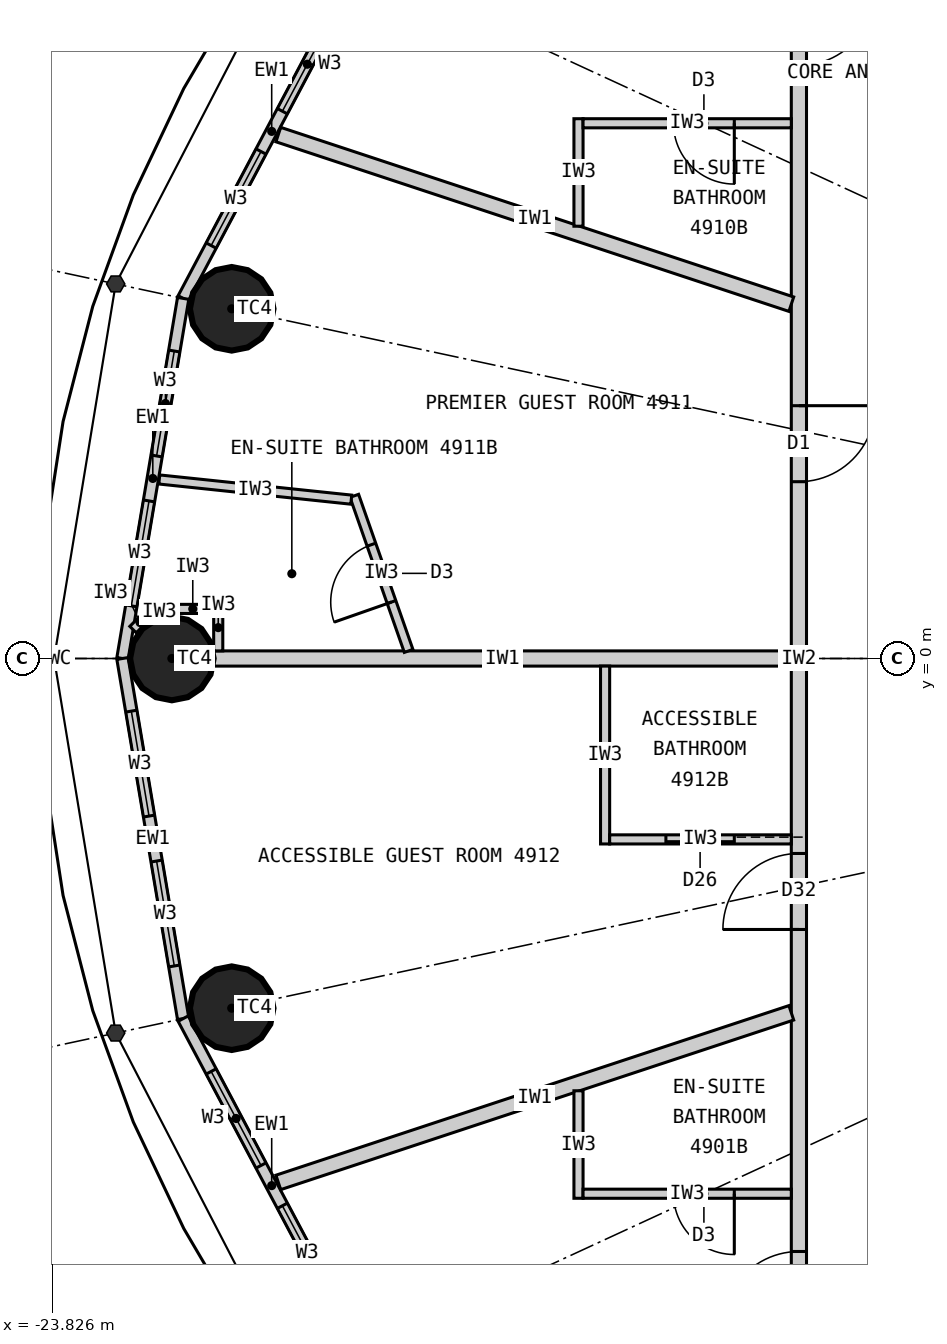
"""IFC4 building model, lengths in metres.
Left out: names, types, materials, properties, quantities, classifications, styles, units other than length and angle.
Written with IfcOpenShell. Run it as: python <this file> out.ifc"""

import sys

from ifc_helpers import new_model, si_unit, direction, frame, frame_2d, origin, origin_2d, place, context, subcontext, project, spatial, rectangle, circle, extrude, clip, halfspace, element, fill, save


model = new_model("IFC4")
c1 = context("Model", 3, precision=1e-05, world=origin(), true_north=direction((0.0, 1.0)))
c2 = subcontext(c1, "Body", "Model", "MODEL_VIEW")
j1 = project(units=[si_unit("LENGTHUNIT", "METRE"), si_unit("PLANEANGLEUNIT", "RADIAN")], contexts=[c1])
p1 = place(None, origin())
s1 = spatial("IfcSite", under=j1, at=p1, CompositionType="ELEMENT")
p2 = place(p1, origin())
s2 = spatial("IfcBuilding", under=s1, at=p2, CompositionType="ELEMENT")
p3 = place(p2, frame((0.0, 0.0, 183.0)))
s3 = spatial("IfcBuildingStorey", under=s2, at=p3, CompositionType="ELEMENT", Elevation=183.0)
for number, where, z_axis, x_axis in (
    (1, (-21.463, 4.601, 0.0), (0.0, 0.0, 1.0), (1.0, 0.0, 0.0)),
    (2, (-22.25, 0.0, 0.0), (0.0, 0.0, 1.0), (1.0, 0.0, 0.0)),
    (3, (-21.463, -4.601, 0.0), (0.0, 0.0, 1.0), (1.0, 0.0, 0.0)),
):
    element("IfcColumn", number, at=place(p3, frame(where, z_axis=z_axis, x_axis=x_axis)), inside=s3, PredefinedType="COLUMN", context=c2, shape_type="Clipping", body=[
        clip(extrude(circle(Radius=0.55, at=origin_2d()), origin(), (0.0, 0.0, 1.0), 3.3), halfspace(frame((0.0, 0.0, 2.25), z_axis=(0.0, 0.0, 1.0), x_axis=(1.0, 0.0, 0.0)), False)),
    ])
p4 = place(p3, frame((-19.772, 9.132, 0.0), z_axis=(0.0, 0.0, 1.0), x_axis=(-0.468428906714, -0.883501193748, 0.0)))
e4 = element("IfcWall", 4, at=p4, inside=s3, PredefinedType="ELEMENTEDWALL", context=c2, shape_type="SweptSolid", body=[
    extrude(rectangle(XDim=4.974, YDim=0.15, at=frame_2d((2.487, 0.0))), origin(), (0.0, 0.0, 1.0), 3.05),
])
p5 = place(p4, frame((0.787, 0.0, 0.9)))
e5 = element("IfcOpeningElement", 5, at=p5, cuts=e4, PredefinedType="OPENING", context=c2, shape_type="SweptSolid", body=[
    extrude(rectangle(XDim=1.4, YDim=1.9, at=frame_2d((0.7, 0.95))), frame((0.0, 0.085, 0.0), z_axis=(0.0, -1.0, 0.0), x_axis=(1.0, 0.0, 0.0)), (0.0, 0.0, 1.0), 0.17),
])
p6 = place(p4, frame((2.787, 0.0, 0.9)))
e6 = element("IfcOpeningElement", 6, at=p6, cuts=e4, PredefinedType="OPENING", context=c2, shape_type="SweptSolid", body=[
    extrude(rectangle(XDim=1.4, YDim=1.9, at=frame_2d((0.7, 0.95))), frame((0.0, 0.085, 0.0), z_axis=(0.0, -1.0, 0.0), x_axis=(1.0, 0.0, 0.0)), (0.0, 0.0, 1.0), 0.17),
])
p7 = place(p3, frame((-22.102, 4.738, 0.0), z_axis=(0.0, 0.0, 1.0), x_axis=(-0.166162111254, -0.986098449843, 0.0)))
e7 = element("IfcWall", 7, at=p7, inside=s3, PredefinedType="ELEMENTEDWALL", context=c2, shape_type="SweptSolid", body=[
    extrude(rectangle(XDim=4.805, YDim=0.15, at=frame_2d((2.402, 0.0))), origin(), (0.0, 0.0, 1.0), 3.05),
])
p8 = place(p7, frame((0.702, 0.0, 0.9)))
e8 = element("IfcOpeningElement", 8, at=p8, cuts=e7, PredefinedType="OPENING", context=c2, shape_type="SweptSolid", body=[
    extrude(rectangle(XDim=1.4, YDim=1.9, at=frame_2d((0.7, 0.95))), frame((0.0, 0.085, 0.0), z_axis=(0.0, -1.0, 0.0), x_axis=(1.0, 0.0, 0.0)), (0.0, 0.0, 1.0), 0.17),
])
p9 = place(p7, frame((2.702, 0.0, 0.9)))
e9 = element("IfcOpeningElement", 9, at=p9, cuts=e7, PredefinedType="OPENING", context=c2, shape_type="SweptSolid", body=[
    extrude(rectangle(XDim=1.4, YDim=1.9, at=frame_2d((0.7, 0.95))), frame((0.0, 0.085, 0.0), z_axis=(0.0, -1.0, 0.0), x_axis=(1.0, 0.0, 0.0)), (0.0, 0.0, 1.0), 0.17),
])
p10 = place(p3, frame((-22.9, 0.0, 0.0), z_axis=(0.0, 0.0, 1.0), x_axis=(0.166162111254, -0.986098449843, 0.0)))
e10 = element("IfcWall", 10, at=p10, inside=s3, PredefinedType="ELEMENTEDWALL", context=c2, shape_type="SweptSolid", body=[
    extrude(rectangle(XDim=4.805, YDim=0.15, at=frame_2d((2.402, 0.0))), origin(), (0.0, 0.0, 1.0), 3.05),
])
p11 = place(p10, frame((0.702, 0.0, 0.9)))
e11 = element("IfcOpeningElement", 11, at=p11, cuts=e10, PredefinedType="OPENING", context=c2, shape_type="SweptSolid", body=[
    extrude(rectangle(XDim=1.4, YDim=1.9, at=frame_2d((0.7, 0.95))), frame((0.0, 0.085, 0.0), z_axis=(0.0, -1.0, 0.0), x_axis=(1.0, 0.0, 0.0)), (0.0, 0.0, 1.0), 0.17),
])
p12 = place(p10, frame((2.702, 0.0, 0.9)))
e12 = element("IfcOpeningElement", 12, at=p12, cuts=e10, PredefinedType="OPENING", context=c2, shape_type="SweptSolid", body=[
    extrude(rectangle(XDim=1.4, YDim=1.9, at=frame_2d((0.7, 0.95))), frame((0.0, 0.085, 0.0), z_axis=(0.0, -1.0, 0.0), x_axis=(1.0, 0.0, 0.0)), (0.0, 0.0, 1.0), 0.17),
])
p13 = place(p3, frame((-22.102, -4.738, 0.0), z_axis=(0.0, 0.0, 1.0), x_axis=(0.468428906714, -0.883501193748, 0.0)))
e13 = element("IfcWall", 13, at=p13, inside=s3, PredefinedType="ELEMENTEDWALL", context=c2, shape_type="SweptSolid", body=[
    extrude(rectangle(XDim=4.974, YDim=0.15, at=frame_2d((2.487, 0.0))), origin(), (0.0, 0.0, 1.0), 3.05),
])
p14 = place(p13, frame((0.787, 0.0, 0.9)))
e14 = element("IfcOpeningElement", 14, at=p14, cuts=e13, PredefinedType="OPENING", context=c2, shape_type="SweptSolid", body=[
    extrude(rectangle(XDim=1.4, YDim=1.9, at=frame_2d((0.7, 0.95))), frame((0.0, 0.085, 0.0), z_axis=(0.0, -1.0, 0.0), x_axis=(1.0, 0.0, 0.0)), (0.0, 0.0, 1.0), 0.17),
])
p15 = place(p13, frame((2.787, 0.0, 0.9)))
e15 = element("IfcOpeningElement", 15, at=p15, cuts=e13, PredefinedType="OPENING", context=c2, shape_type="SweptSolid", body=[
    extrude(rectangle(XDim=1.4, YDim=1.9, at=frame_2d((0.7, 0.95))), frame((0.0, 0.085, 0.0), z_axis=(0.0, -1.0, 0.0), x_axis=(1.0, 0.0, 0.0)), (0.0, 0.0, 1.0), 0.17),
])
p16 = place(p3, frame((-14.0, 9.9, 0.0), z_axis=(0.0, 0.0, 1.0), x_axis=(0.0, -1.0, 0.0)))
e16 = element("IfcWall", 16, at=p16, inside=s3, PredefinedType="PARTITIONING", context=c2, shape_type="SweptSolid", body=[
    extrude(rectangle(XDim=19.8, YDim=0.2, at=frame_2d((9.9, 0.0))), origin(), (0.0, 0.0, 1.0), 3.05),
])
p17 = place(p16, frame((17.701, 0.0, 0.0)))
e17 = element("IfcOpeningElement", 17, at=p17, cuts=e16, PredefinedType="OPENING", context=c2, shape_type="SweptSolid", body=[
    extrude(rectangle(XDim=1.0, YDim=2.2, at=frame_2d((0.5, 1.1))), frame((0.0, 0.11, 0.0), z_axis=(0.0, -1.0, 0.0), x_axis=(1.0, 0.0, 0.0)), (0.0, 0.0, 1.0), 0.22),
])
p18 = place(p16, frame((1.1, 0.0, 0.0)))
e18 = element("IfcOpeningElement", 18, at=p18, cuts=e16, PredefinedType="OPENING", context=c2, shape_type="SweptSolid", body=[
    extrude(rectangle(XDim=1.0, YDim=2.2, at=frame_2d((0.5, 1.1))), frame((0.0, 0.11, 0.0), z_axis=(0.0, -1.0, 0.0), x_axis=(1.0, 0.0, 0.0)), (0.0, 0.0, 1.0), 0.22),
])
p19 = place(p16, frame((6.574, 0.0, 0.0)))
e19 = element("IfcOpeningElement", 19, at=p19, cuts=e16, PredefinedType="OPENING", context=c2, shape_type="SweptSolid", body=[
    extrude(rectangle(XDim=1.0, YDim=2.2, at=frame_2d((0.5, 1.1))), frame((0.0, 0.11, 0.0), z_axis=(0.0, -1.0, 0.0), x_axis=(1.0, 0.0, 0.0)), (0.0, 0.0, 1.0), 0.22),
])
p20 = place(p16, frame((12.465, 0.0, 0.0)))
e20 = element("IfcOpeningElement", 20, at=p20, cuts=e16, PredefinedType="OPENING", context=c2, shape_type="SweptSolid", body=[
    extrude(rectangle(XDim=1.0, YDim=2.1, at=frame_2d((0.5, 1.05))), frame((0.0, 0.11, 0.0), z_axis=(0.0, -1.0, 0.0), x_axis=(1.0, 0.0, 0.0)), (0.0, 0.0, 1.0), 0.22),
])
p21 = place(p3, frame((-14.1, 4.661, 0.0), z_axis=(0.0, 0.0, 1.0), x_axis=(-0.949453216399, 0.313908569285, 0.0)))
e21 = element("IfcWall", 21, at=p21, inside=s3, PredefinedType="PARTITIONING", context=c2, shape_type="SweptSolid", body=[
    extrude(rectangle(XDim=7.109, YDim=0.2, at=frame_2d((3.554, 0.0))), origin(), (0.0, 0.0, 1.0), 3.05),
])
p22 = place(p3, frame((-14.1, 0.0, 0.0), z_axis=(0.0, 0.0, 1.0), x_axis=(-1.0, 0.0, 0.0)))
e22 = element("IfcWall", 22, at=p22, inside=s3, PredefinedType="PARTITIONING", context=c2, shape_type="SweptSolid", body=[
    extrude(rectangle(XDim=7.6, YDim=0.2, at=frame_2d((3.8, 0.0))), origin(), (0.0, 0.0, 1.0), 2.25),
])
p23 = place(p3, frame((-14.1, -4.661, 0.0), z_axis=(0.0, 0.0, 1.0), x_axis=(-0.949453216399, -0.313908569285, 0.0)))
e23 = element("IfcWall", 23, at=p23, inside=s3, PredefinedType="PARTITIONING", context=c2, shape_type="SweptSolid", body=[
    extrude(rectangle(XDim=7.109, YDim=0.2, at=frame_2d((3.554, 0.0))), origin(), (0.0, 0.0, 1.0), 3.05),
])
p24 = place(p3, frame((-16.9, -5.687, 0.0), z_axis=(0.0, 0.0, 1.0), x_axis=(0.0, -1.0, 0.0)))
e24 = element("IfcWall", 24, at=p24, inside=s3, PredefinedType="PARTITIONING", context=c2, shape_type="SweptSolid", body=[
    extrude(rectangle(XDim=1.414, YDim=0.12, at=frame_2d((0.707, 0.0))), origin(), (0.0, 0.0, 1.0), 3.05),
])
p25 = place(p3, frame((-14.1, -7.042, 0.0), z_axis=(0.0, 0.0, 1.0), x_axis=(-1.0, 0.0, 0.0)))
e25 = element("IfcWall", 25, at=p25, inside=s3, PredefinedType="PARTITIONING", context=c2, shape_type="SweptSolid", body=[
    extrude(rectangle(XDim=2.74, YDim=0.12, at=frame_2d((1.37, 0.0))), origin(), (0.0, 0.0, 1.0), 3.05),
])
p26 = place(p25, frame((0.75, 0.0, 0.0)))
e26 = element("IfcOpeningElement", 26, at=p26, cuts=e25, PredefinedType="OPENING", context=c2, shape_type="SweptSolid", body=[
    extrude(rectangle(XDim=0.8, YDim=2.1, at=frame_2d((0.4, 1.05))), frame((0.0, 0.07, 0.0), z_axis=(0.0, -1.0, 0.0), x_axis=(1.0, 0.0, 0.0)), (0.0, 0.0, 1.0), 0.14),
])
p27 = place(p3, frame((-16.9, 5.687, 0.0), z_axis=(0.0, 0.0, 1.0), x_axis=(0.0, 1.0, 0.0)))
e27 = element("IfcWall", 27, at=p27, inside=s3, PredefinedType="PARTITIONING", context=c2, shape_type="SweptSolid", body=[
    extrude(rectangle(XDim=1.414, YDim=0.12, at=frame_2d((0.707, 0.0))), origin(), (0.0, 0.0, 1.0), 3.05),
])
p28 = place(p3, frame((-14.1, 7.042, 0.0), z_axis=(0.0, 0.0, 1.0), x_axis=(-1.0, 0.0, 0.0)))
e28 = element("IfcWall", 28, at=p28, inside=s3, PredefinedType="PARTITIONING", context=c2, shape_type="SweptSolid", body=[
    extrude(rectangle(XDim=2.74, YDim=0.12, at=frame_2d((1.37, 0.0))), origin(), (0.0, 0.0, 1.0), 3.05),
])
p29 = place(p28, frame((0.75, 0.0, 0.0)))
e29 = element("IfcOpeningElement", 29, at=p29, cuts=e28, PredefinedType="OPENING", context=c2, shape_type="SweptSolid", body=[
    extrude(rectangle(XDim=0.8, YDim=2.1, at=frame_2d((0.4, 1.05))), frame((0.0, 0.07, 0.0), z_axis=(0.0, -1.0, 0.0), x_axis=(1.0, 0.0, 0.0)), (0.0, 0.0, 1.0), 0.14),
])
p30 = place(p3, frame((-19.135, 0.1, 0.0), z_axis=(0.0, 0.0, 1.0), x_axis=(-0.330692497329, 0.943738561367, 0.0)))
e30 = element("IfcWall", 30, at=p30, inside=s3, PredefinedType="PARTITIONING", context=c2, shape_type="SweptSolid", body=[
    extrude(rectangle(XDim=2.162, YDim=0.12, at=frame_2d((1.081, 0.0))), origin(), (0.0, 0.0, 1.0), 3.05),
])
p31 = place(p30, frame((0.681, 0.0, 0.0)))
e31 = element("IfcOpeningElement", 31, at=p31, cuts=e30, PredefinedType="OPENING", context=c2, shape_type="SweptSolid", body=[
    extrude(rectangle(XDim=0.8, YDim=2.1, at=frame_2d((0.4, 1.05))), frame((0.0, 0.07, 0.0), z_axis=(0.0, -1.0, 0.0), x_axis=(1.0, 0.0, 0.0)), (0.0, 0.0, 1.0), 0.14),
])
p32 = place(p3, frame((-19.89, 2.09, 0.0), z_axis=(0.0, 0.0, 1.0), x_axis=(-0.994527025269, 0.104479644, 0.0)))
e32 = element("IfcWall", 32, at=p32, inside=s3, PredefinedType="PARTITIONING", context=c2, shape_type="SweptSolid", body=[
    extrude(rectangle(XDim=2.54, YDim=0.12, at=frame_2d((1.27, 0.0))), origin(), (0.0, 0.0, 1.0), 3.05),
])
p33 = place(p3, frame((-21.64, 0.1, 0.0), z_axis=(0.0, 0.0, 1.0), x_axis=(0.0, 1.0, 0.0)))
e33 = element("IfcWall", 33, at=p33, inside=s3, PredefinedType="PARTITIONING", context=c2, shape_type="SweptSolid", body=[
    extrude(rectangle(XDim=0.612, YDim=0.12, at=frame_2d((0.306, 0.0))), origin(), (0.0, 0.0, 1.0), 3.05),
])
p34 = place(p3, frame((-21.7, 0.652, 0.0), z_axis=(0.0, 0.0, 1.0), x_axis=(-1.0, 0.0, 0.0)))
e34 = element("IfcWall", 34, at=p34, inside=s3, PredefinedType="PARTITIONING", context=c2, shape_type="SweptSolid", body=[
    extrude(rectangle(XDim=0.55, YDim=0.12, at=frame_2d((0.275, 0.0))), origin(), (0.0, 0.0, 1.0), 3.05),
])
p35 = place(p3, frame((-22.25, 0.652, 0.0), z_axis=(0.0, 0.0, 1.0), x_axis=(-0.965922233104, -0.258832454679, 0.0)))
e35 = element("IfcWall", 35, at=p35, inside=s3, PredefinedType="PARTITIONING", context=c2, shape_type="SweptSolid", body=[
    extrude(rectangle(XDim=0.338, YDim=0.12, at=frame_2d((0.169, 0.0))), origin(), (0.0, 0.0, 1.0), 3.05),
])
p36 = place(p3, frame((-22.576, 0.565, 0.0), z_axis=(0.0, 0.0, 1.0), x_axis=(-0.706639272724, -0.707573980757, 0.0)))
e36 = element("IfcWall", 36, at=p36, inside=s3, PredefinedType="PARTITIONING", context=c2, shape_type="SweptSolid", body=[
    extrude(rectangle(XDim=0.261, YDim=0.12, at=frame_2d((0.131, 0.0))), origin(), (0.0, 0.0, 1.0), 3.05),
])
p37 = place(p3, frame((-16.55, -0.1, 0.0), z_axis=(0.0, 0.0, 1.0), x_axis=(0.0, -1.0, 0.0)))
e37 = element("IfcWall", 37, at=p37, inside=s3, PredefinedType="PARTITIONING", context=c2, shape_type="SweptSolid", body=[
    extrude(rectangle(XDim=2.34, YDim=0.12, at=frame_2d((1.17, 0.0))), origin(), (0.0, 0.0, 1.0), 3.05),
])
p38 = place(p3, frame((-14.1, -2.38, 0.0), z_axis=(0.0, 0.0, 1.0), x_axis=(-1.0, 0.0, 0.0)))
e38 = element("IfcWall", 38, at=p38, inside=s3, PredefinedType="PARTITIONING", context=c2, shape_type="SweptSolid", body=[
    extrude(rectangle(XDim=2.39, YDim=0.12, at=frame_2d((1.195, 0.0))), origin(), (0.0, 0.0, 1.0), 3.05),
])
p39 = place(p38, frame((0.75, 0.0, 0.0)))
e39 = element("IfcOpeningElement", 39, at=p39, cuts=e38, PredefinedType="OPENING", context=c2, shape_type="SweptSolid", body=[
    extrude(rectangle(XDim=0.9, YDim=2.1, at=frame_2d((0.45, 1.05))), frame((0.0, 0.07, 0.0), z_axis=(0.0, -1.0, 0.0), x_axis=(1.0, 0.0, 0.0)), (0.0, 0.0, 1.0), 0.14),
])
p40 = place(p5, origin())
e40 = element("IfcWindow", 40, at=p40, inside=s3, PartitioningType="SINGLE_PANEL", PredefinedType="WINDOW", context=c2, shape_type="SweptSolid", body=[
    extrude(rectangle(XDim=1.4, YDim=1.9, at=frame_2d((0.7, 0.95))), frame((0.0, 0.03, 0.0), z_axis=(0.0, -1.0, 0.0), x_axis=(1.0, 0.0, 0.0)), (0.0, 0.0, 1.0), 0.06),
])
fill(e5, e40)
p41 = place(p6, origin())
e41 = element("IfcWindow", 41, at=p41, inside=s3, PartitioningType="SINGLE_PANEL", PredefinedType="WINDOW", context=c2, shape_type="SweptSolid", body=[
    extrude(rectangle(XDim=1.4, YDim=1.9, at=frame_2d((0.7, 0.95))), frame((0.0, 0.03, 0.0), z_axis=(0.0, -1.0, 0.0), x_axis=(1.0, 0.0, 0.0)), (0.0, 0.0, 1.0), 0.06),
])
fill(e6, e41)
p42 = place(p8, origin())
e42 = element("IfcWindow", 42, at=p42, inside=s3, PartitioningType="SINGLE_PANEL", PredefinedType="WINDOW", context=c2, shape_type="SweptSolid", body=[
    extrude(rectangle(XDim=1.4, YDim=1.9, at=frame_2d((0.7, 0.95))), frame((0.0, 0.03, 0.0), z_axis=(0.0, -1.0, 0.0), x_axis=(1.0, 0.0, 0.0)), (0.0, 0.0, 1.0), 0.06),
])
fill(e8, e42)
p43 = place(p9, origin())
e43 = element("IfcWindow", 43, at=p43, inside=s3, PartitioningType="SINGLE_PANEL", PredefinedType="WINDOW", context=c2, shape_type="SweptSolid", body=[
    extrude(rectangle(XDim=1.4, YDim=1.9, at=frame_2d((0.7, 0.95))), frame((0.0, 0.03, 0.0), z_axis=(0.0, -1.0, 0.0), x_axis=(1.0, 0.0, 0.0)), (0.0, 0.0, 1.0), 0.06),
])
fill(e9, e43)
p44 = place(p11, origin())
e44 = element("IfcWindow", 44, at=p44, inside=s3, PartitioningType="SINGLE_PANEL", PredefinedType="WINDOW", context=c2, shape_type="SweptSolid", body=[
    extrude(rectangle(XDim=1.4, YDim=1.9, at=frame_2d((0.7, 0.95))), frame((0.0, 0.03, 0.0), z_axis=(0.0, -1.0, 0.0), x_axis=(1.0, 0.0, 0.0)), (0.0, 0.0, 1.0), 0.06),
])
fill(e11, e44)
p45 = place(p12, origin())
e45 = element("IfcWindow", 45, at=p45, inside=s3, PartitioningType="SINGLE_PANEL", PredefinedType="WINDOW", context=c2, shape_type="SweptSolid", body=[
    extrude(rectangle(XDim=1.4, YDim=1.9, at=frame_2d((0.7, 0.95))), frame((0.0, 0.03, 0.0), z_axis=(0.0, -1.0, 0.0), x_axis=(1.0, 0.0, 0.0)), (0.0, 0.0, 1.0), 0.06),
])
fill(e12, e45)
p46 = place(p14, origin())
e46 = element("IfcWindow", 46, at=p46, inside=s3, PartitioningType="SINGLE_PANEL", PredefinedType="WINDOW", context=c2, shape_type="SweptSolid", body=[
    extrude(rectangle(XDim=1.4, YDim=1.9, at=frame_2d((0.7, 0.95))), frame((0.0, 0.03, 0.0), z_axis=(0.0, -1.0, 0.0), x_axis=(1.0, 0.0, 0.0)), (0.0, 0.0, 1.0), 0.06),
])
fill(e14, e46)
p47 = place(p15, origin())
e47 = element("IfcWindow", 47, at=p47, inside=s3, PartitioningType="SINGLE_PANEL", PredefinedType="WINDOW", context=c2, shape_type="SweptSolid", body=[
    extrude(rectangle(XDim=1.4, YDim=1.9, at=frame_2d((0.7, 0.95))), frame((0.0, 0.03, 0.0), z_axis=(0.0, -1.0, 0.0), x_axis=(1.0, 0.0, 0.0)), (0.0, 0.0, 1.0), 0.06),
])
fill(e15, e47)
p48 = place(p26, origin())
e48 = element("IfcDoor", 48, at=p48, inside=s3, OperationType="SINGLE_SWING_LEFT", PredefinedType="DOOR", context=c2, shape_type="SweptSolid", body=[
    extrude(rectangle(XDim=0.8, YDim=2.1, at=frame_2d((0.4, 1.05))), frame((0.0, 0.025, 0.0), z_axis=(0.0, -1.0, 0.0), x_axis=(1.0, 0.0, 0.0)), (0.0, 0.0, 1.0), 0.05),
])
fill(e26, e48)
p49 = place(p17, origin())
e49 = element("IfcDoor", 49, at=p49, inside=s3, OperationType="SINGLE_SWING_RIGHT", PredefinedType="DOOR", context=c2, shape_type="SweptSolid", body=[
    extrude(rectangle(XDim=1.0, YDim=2.2, at=frame_2d((0.5, 1.1))), frame((0.0, 0.025, 0.0), z_axis=(0.0, -1.0, 0.0), x_axis=(1.0, 0.0, 0.0)), (0.0, 0.0, 1.0), 0.05),
])
fill(e17, e49)
p50 = place(p29, origin())
e50 = element("IfcDoor", 50, at=p50, inside=s3, OperationType="SINGLE_SWING_LEFT", PredefinedType="DOOR", context=c2, shape_type="SweptSolid", body=[
    extrude(rectangle(XDim=0.8, YDim=2.1, at=frame_2d((0.4, 1.05))), frame((0.0, 0.025, 0.0), z_axis=(0.0, -1.0, 0.0), x_axis=(1.0, 0.0, 0.0)), (0.0, 0.0, 1.0), 0.05),
])
fill(e29, e50)
p51 = place(p18, origin())
e51 = element("IfcDoor", 51, at=p51, inside=s3, OperationType="SINGLE_SWING_LEFT", PredefinedType="DOOR", context=c2, shape_type="SweptSolid", body=[
    extrude(rectangle(XDim=1.0, YDim=2.2, at=frame_2d((0.5, 1.1))), frame((0.0, 0.025, 0.0), z_axis=(0.0, -1.0, 0.0), x_axis=(1.0, 0.0, 0.0)), (0.0, 0.0, 1.0), 0.05),
])
fill(e18, e51)
p52 = place(p31, origin())
e52 = element("IfcDoor", 52, at=p52, inside=s3, OperationType="SINGLE_SWING_LEFT", PredefinedType="DOOR", context=c2, shape_type="SweptSolid", body=[
    extrude(rectangle(XDim=0.8, YDim=2.1, at=frame_2d((0.4, 1.05))), frame((0.0, 0.025, 0.0), z_axis=(0.0, -1.0, 0.0), x_axis=(1.0, 0.0, 0.0)), (0.0, 0.0, 1.0), 0.05),
])
fill(e31, e52)
p53 = place(p19, origin())
e53 = element("IfcDoor", 53, at=p53, inside=s3, OperationType="SINGLE_SWING_LEFT", PredefinedType="DOOR", context=c2, shape_type="SweptSolid", body=[
    extrude(rectangle(XDim=1.0, YDim=2.2, at=frame_2d((0.5, 1.1))), frame((0.0, 0.025, 0.0), z_axis=(0.0, -1.0, 0.0), x_axis=(1.0, 0.0, 0.0)), (0.0, 0.0, 1.0), 0.05),
])
fill(e19, e53)
p54 = place(p39, origin())
e54 = element("IfcDoor", 54, at=p54, inside=s3, OperationType="SLIDING_TO_LEFT", PredefinedType="DOOR", context=c2, shape_type="SweptSolid", body=[
    extrude(rectangle(XDim=0.9, YDim=2.1, at=frame_2d((0.45, 1.05))), frame((0.0, 0.025, 0.0), z_axis=(0.0, -1.0, 0.0), x_axis=(1.0, 0.0, 0.0)), (0.0, 0.0, 1.0), 0.05),
])
fill(e39, e54)
p55 = place(p20, origin())
e55 = element("IfcDoor", 55, at=p55, inside=s3, OperationType="SINGLE_SWING_RIGHT", PredefinedType="DOOR", context=c2, shape_type="SweptSolid", body=[
    extrude(rectangle(XDim=1.0, YDim=2.1, at=frame_2d((0.5, 1.05))), frame((0.0, 0.025, 0.0), z_axis=(0.0, -1.0, 0.0), x_axis=(1.0, 0.0, 0.0)), (0.0, 0.0, 1.0), 0.05),
])
fill(e20, e55)
save(model, sys.argv[1])
